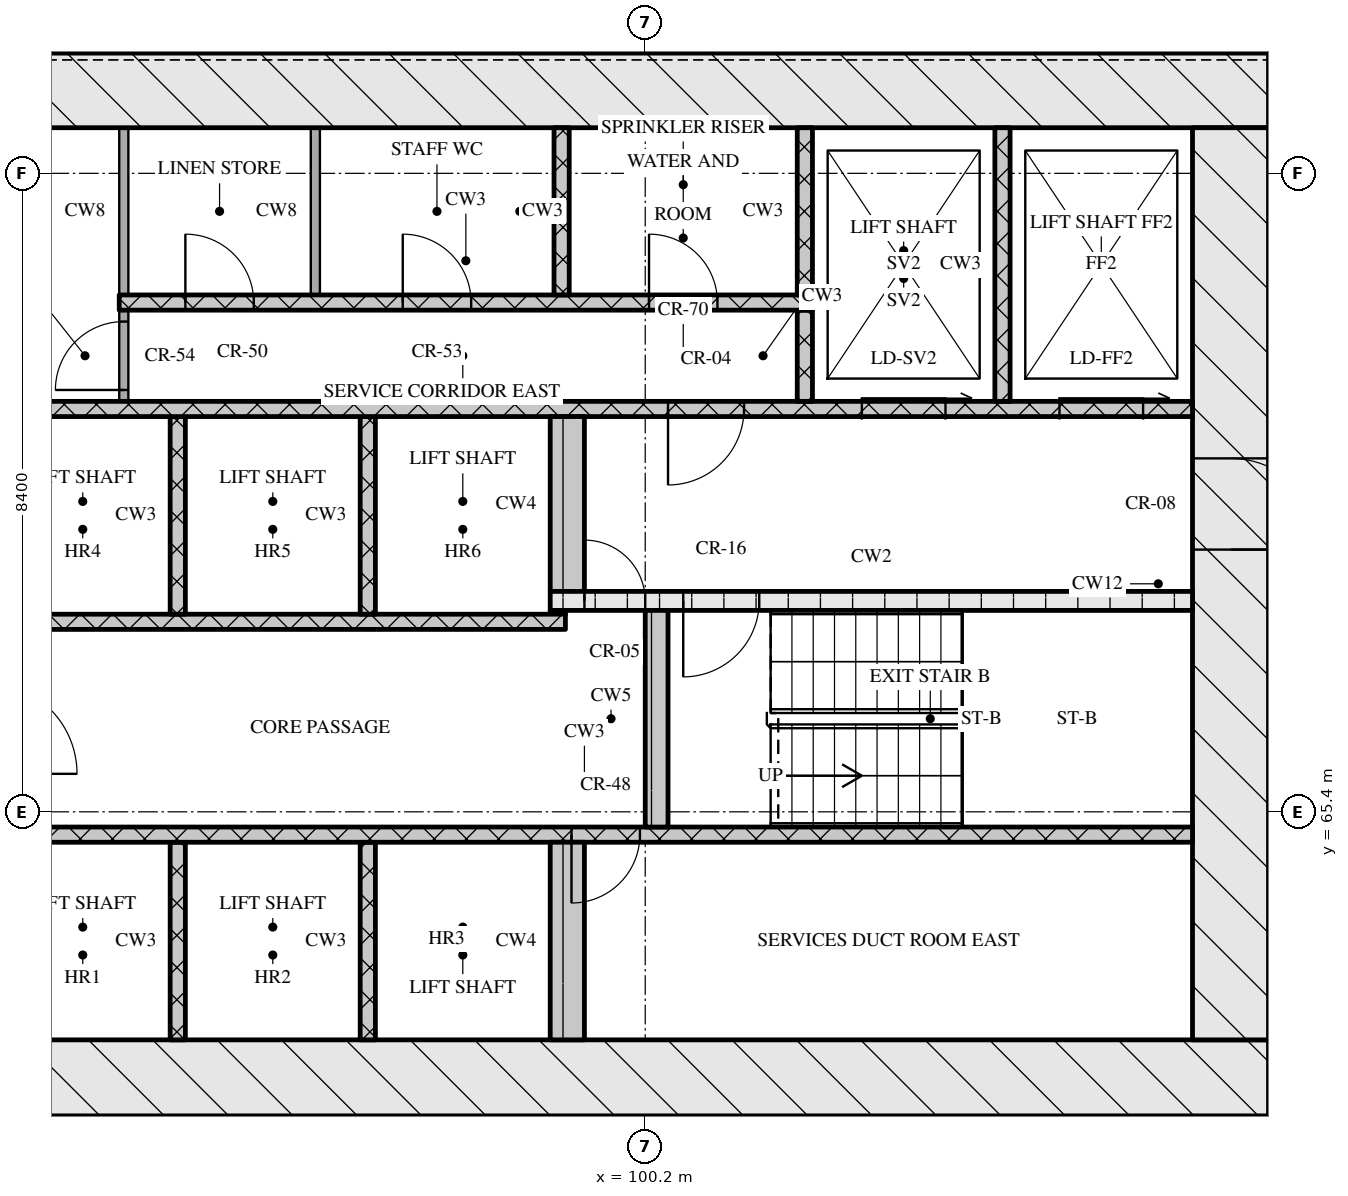
"""IFC4 building model, lengths in metres.
Left out: names, types, materials, properties, quantities, classifications, styles, units other than length and angle.
Written with IfcOpenShell. Run it as: python <this file> out.ifc"""

import sys

from ifc_helpers import new_model, si_unit, direction, frame, frame_2d, origin, place, context, subcontext, project, spatial, rectangle, extrude, element, fill, save


model = new_model("IFC4")
c1 = context("Model", 3, precision=1e-05, world=origin(), true_north=direction((0.0, 1.0)))
c2 = subcontext(c1, "Body", "Model", "MODEL_VIEW")
j1 = project(units=[si_unit("LENGTHUNIT", "METRE"), si_unit("PLANEANGLEUNIT", "RADIAN")], contexts=[c1])
p1 = place(None, origin())
s1 = spatial("IfcSite", under=j1, at=p1, CompositionType="ELEMENT")
p2 = place(p1, origin())
s2 = spatial("IfcBuilding", under=s1, at=p2, CompositionType="ELEMENT")
p3 = place(p2, frame((0.0, 0.0, 95.25)))
s3 = spatial("IfcBuildingStorey", under=s2, at=p3, CompositionType="ELEMENT", Elevation=95.25)
p4 = place(p3, frame((66.8, 61.9, 0.0), z_axis=(0.0, 0.0, 1.0), x_axis=(1.0, 0.0, 0.0)))
e1 = element("IfcWall", 1, at=p4, inside=s3, PredefinedType="SOLIDWALL", context=c2, shape_type="SweptSolid", body=[
    extrude(rectangle(XDim=41.6, YDim=1.0, at=frame_2d((20.8, 0.0))), origin(), (0.0, 0.0, 1.0), 3.32),
])
p5 = place(p4, frame((21.15, 0.0, 0.0)))
e2 = element("IfcOpeningElement", 2, at=p5, cuts=e1, PredefinedType="OPENING", context=c2, shape_type="SweptSolid", body=[
    extrude(rectangle(XDim=1.8, YDim=2.1, at=frame_2d((0.9, 1.05))), frame((0.0, 0.51, 0.0), z_axis=(0.0, -1.0, 0.0), x_axis=(1.0, 0.0, 0.0)), (0.0, 0.0, 1.0), 1.02),
])
p6 = place(p3, frame((66.8, 74.9, 0.0), z_axis=(0.0, 0.0, 1.0), x_axis=(1.0, 0.0, 0.0)))
e3 = element("IfcWall", 3, at=p6, inside=s3, PredefinedType="SOLIDWALL", context=c2, shape_type="SweptSolid", body=[
    extrude(rectangle(XDim=41.6, YDim=1.0, at=frame_2d((20.8, 0.0))), origin(), (0.0, 0.0, 1.0), 3.32),
])
p7 = place(p3, frame((107.9, 62.4, 0.0), z_axis=(0.0, 0.0, 1.0), x_axis=(0.0, 1.0, 0.0)))
e4 = element("IfcWall", 4, at=p7, inside=s3, PredefinedType="SOLIDWALL", context=c2, shape_type="SweptSolid", body=[
    extrude(rectangle(XDim=12.0, YDim=1.0, at=frame_2d((6.0, 0.0))), origin(), (0.0, 0.0, 1.0), 3.32),
])
p8 = place(p7, frame((6.45, 0.0, 0.0)))
e5 = element("IfcOpeningElement", 5, at=p8, cuts=e4, PredefinedType="OPENING", context=c2, shape_type="SweptSolid", body=[
    extrude(rectangle(XDim=1.2, YDim=2.1, at=frame_2d((0.6, 1.05))), frame((0.0, 0.51, 0.0), z_axis=(0.0, -1.0, 0.0), x_axis=(1.0, 0.0, 0.0)), (0.0, 0.0, 1.0), 1.02),
])
for number, where, z_axis, x_axis in (
    (6, (94.05, 62.4, 0.0), (0.0, 0.0, 1.0), (0.0, 1.0, 0.0)),
    (7, (96.55, 62.4, 0.0), (0.0, 0.0, 1.0), (0.0, 1.0, 0.0)),
):
    element("IfcWall", number, at=place(p3, frame(where, z_axis=z_axis, x_axis=x_axis)), inside=s3, PredefinedType="SOLIDWALL", context=c2, shape_type="SweptSolid", body=[
        extrude(rectangle(XDim=2.6, YDim=0.2, at=frame_2d((1.3, 0.0))), origin(), (0.0, 0.0, 1.0), 3.32),
    ])
p9 = place(p3, frame((99.175, 62.4, 0.0), z_axis=(0.0, 0.0, 1.0), x_axis=(0.0, 1.0, 0.0)))
e8 = element("IfcWall", 8, at=p9, inside=s3, PredefinedType="SOLIDWALL", context=c2, shape_type="SweptSolid", body=[
    extrude(rectangle(XDim=2.6, YDim=0.45, at=frame_2d((1.3, 0.0))), origin(), (0.0, 0.0, 1.0), 3.32),
])
p10 = place(p3, frame((91.4, 65.1, 0.0), z_axis=(0.0, 0.0, 1.0), x_axis=(1.0, 0.0, 0.0)))
e9 = element("IfcWall", 9, at=p10, inside=s3, PredefinedType="SOLIDWALL", context=c2, shape_type="SweptSolid", body=[
    extrude(rectangle(XDim=16.0, YDim=0.2, at=frame_2d((8.0, 0.0))), origin(), (0.0, 0.0, 1.0), 3.32),
])
p11 = place(p10, frame((7.83, 0.0, 0.0)))
e10 = element("IfcOpeningElement", 10, at=p11, cuts=e9, PredefinedType="OPENING", context=c2, shape_type="SweptSolid", body=[
    extrude(rectangle(XDim=0.9, YDim=2.1, at=frame_2d((0.45, 1.05))), frame((0.0, 0.11, 0.0), z_axis=(0.0, -1.0, 0.0), x_axis=(1.0, 0.0, 0.0)), (0.0, 0.0, 1.0), 0.22),
])
p12 = place(p3, frame((100.35, 65.2, 0.0), z_axis=(0.0, 0.0, 1.0), x_axis=(0.0, 1.0, 0.0)))
e11 = element("IfcWall", 11, at=p12, inside=s3, PredefinedType="SOLIDWALL", context=c2, shape_type="SweptSolid", body=[
    extrude(rectangle(XDim=2.85, YDim=0.3, at=frame_2d((1.425, 0.0))), origin(), (0.0, 0.0, 1.0), 3.32),
])
p13 = place(p3, frame((76.05, 67.9, 0.0), z_axis=(0.0, 0.0, 1.0), x_axis=(1.0, 0.0, 0.0)))
e12 = element("IfcWall", 12, at=p13, inside=s3, PredefinedType="SOLIDWALL", context=c2, shape_type="SweptSolid", body=[
    extrude(rectangle(XDim=23.1, YDim=0.2, at=frame_2d((11.55, 0.0))), origin(), (0.0, 0.0, 1.0), 3.32),
])
p14 = place(p13, frame((0.6, 0.0, 0.0)))
e13 = element("IfcOpeningElement", 13, at=p14, cuts=e12, PredefinedType="OPENING", context=c2, shape_type="SweptSolid", body=[
    extrude(rectangle(XDim=1.1, YDim=2.1, at=frame_2d((0.55, 1.05))), frame((0.0, 0.11, 0.0), z_axis=(0.0, -1.0, 0.0), x_axis=(1.0, 0.0, 0.0)), (0.0, 0.0, 1.0), 0.22),
])
p15 = place(p13, frame((3.1, 0.0, 0.0)))
e14 = element("IfcOpeningElement", 14, at=p15, cuts=e12, PredefinedType="OPENING", context=c2, shape_type="SweptSolid", body=[
    extrude(rectangle(XDim=1.1, YDim=2.1, at=frame_2d((0.55, 1.05))), frame((0.0, 0.11, 0.0), z_axis=(0.0, -1.0, 0.0), x_axis=(1.0, 0.0, 0.0)), (0.0, 0.0, 1.0), 0.22),
])
p16 = place(p13, frame((5.6, 0.0, 0.0)))
e15 = element("IfcOpeningElement", 15, at=p16, cuts=e12, PredefinedType="OPENING", context=c2, shape_type="SweptSolid", body=[
    extrude(rectangle(XDim=1.1, YDim=2.1, at=frame_2d((0.55, 1.05))), frame((0.0, 0.11, 0.0), z_axis=(0.0, -1.0, 0.0), x_axis=(1.0, 0.0, 0.0)), (0.0, 0.0, 1.0), 0.22),
])
p17 = place(p13, frame((8.45, 0.0, 0.0)))
e16 = element("IfcOpeningElement", 16, at=p17, cuts=e12, PredefinedType="OPENING", context=c2, shape_type="SweptSolid", body=[
    extrude(rectangle(XDim=0.9, YDim=2.1, at=frame_2d((0.45, 1.05))), frame((0.0, 0.11, 0.0), z_axis=(0.0, -1.0, 0.0), x_axis=(1.0, 0.0, 0.0)), (0.0, 0.0, 1.0), 0.22),
])
p18 = place(p13, frame((10.91, 0.0, 0.0)))
e17 = element("IfcOpeningElement", 17, at=p18, cuts=e12, PredefinedType="OPENING", context=c2, shape_type="SweptSolid", body=[
    extrude(rectangle(XDim=0.9, YDim=2.1, at=frame_2d((0.45, 1.05))), frame((0.0, 0.11, 0.0), z_axis=(0.0, -1.0, 0.0), x_axis=(1.0, 0.0, 0.0)), (0.0, 0.0, 1.0), 0.22),
])
p19 = place(p13, frame((13.55, 0.0, 0.0)))
e18 = element("IfcOpeningElement", 18, at=p19, cuts=e12, PredefinedType="OPENING", context=c2, shape_type="SweptSolid", body=[
    extrude(rectangle(XDim=1.0, YDim=2.1, at=frame_2d((0.5, 1.05))), frame((0.0, 0.11, 0.0), z_axis=(0.0, -1.0, 0.0), x_axis=(1.0, 0.0, 0.0)), (0.0, 0.0, 1.0), 0.22),
])
for number, where, z_axis, x_axis in (
    (19, (94.05, 68.0, 0.0), (0.0, 0.0, 1.0), (0.0, 1.0, 0.0)),
    (20, (96.55, 68.0, 0.0), (0.0, 0.0, 1.0), (0.0, 1.0, 0.0)),
):
    element("IfcWall", number, at=place(p3, frame(where, z_axis=z_axis, x_axis=x_axis)), inside=s3, PredefinedType="SOLIDWALL", context=c2, shape_type="SweptSolid", body=[
        extrude(rectangle(XDim=2.6, YDim=0.2, at=frame_2d((1.3, 0.0))), origin(), (0.0, 0.0, 1.0), 3.32),
    ])
p20 = place(p3, frame((98.95, 68.025, 0.0), z_axis=(0.0, 0.0, 1.0), x_axis=(1.0, 0.0, 0.0)))
e21 = element("IfcWall", 21, at=p20, inside=s3, PredefinedType="SOLIDWALL", context=c2, shape_type="SweptSolid", body=[
    extrude(rectangle(XDim=0.2, YDim=0.05, at=frame_2d((0.1, 0.0))), origin(), (0.0, 0.0, 1.0), 3.32),
])
p21 = place(p3, frame((98.95, 68.175, 0.0), z_axis=(0.0, 0.0, 1.0), x_axis=(1.0, 0.0, 0.0)))
e22 = element("IfcWall", 22, at=p21, inside=s3, PredefinedType="SOLIDWALL", context=c2, shape_type="SweptSolid", body=[
    extrude(rectangle(XDim=8.45, YDim=0.25, at=frame_2d((4.225, 0.0))), origin(), (0.0, 0.0, 1.0), 3.32),
])
p22 = place(p21, frame((0.45, 0.0, 0.0)))
e23 = element("IfcOpeningElement", 23, at=p22, cuts=e22, PredefinedType="OPENING", context=c2, shape_type="SweptSolid", body=[
    extrude(rectangle(XDim=0.8, YDim=2.1, at=frame_2d((0.4, 1.05))), frame((0.0, 0.135, 0.0), z_axis=(0.0, -1.0, 0.0), x_axis=(1.0, 0.0, 0.0)), (0.0, 0.0, 1.0), 0.27),
])
p23 = place(p21, frame((1.75, 0.0, 0.0)))
e24 = element("IfcOpeningElement", 24, at=p23, cuts=e22, PredefinedType="OPENING", context=c2, shape_type="SweptSolid", body=[
    extrude(rectangle(XDim=1.0, YDim=2.1, at=frame_2d((0.5, 1.05))), frame((0.0, 0.135, 0.0), z_axis=(0.0, -1.0, 0.0), x_axis=(1.0, 0.0, 0.0)), (0.0, 0.0, 1.0), 0.27),
])
p24 = place(p3, frame((99.175, 68.3, 0.0), z_axis=(0.0, 0.0, 1.0), x_axis=(0.0, 1.0, 0.0)))
e25 = element("IfcWall", 25, at=p24, inside=s3, PredefinedType="SOLIDWALL", context=c2, shape_type="SweptSolid", body=[
    extrude(rectangle(XDim=2.3, YDim=0.45, at=frame_2d((1.15, 0.0))), origin(), (0.0, 0.0, 1.0), 3.32),
])
p25 = place(p3, frame((67.8, 70.7, 0.0), z_axis=(0.0, 0.0, 1.0), x_axis=(1.0, 0.0, 0.0)))
e26 = element("IfcWall", 26, at=p25, inside=s3, PredefinedType="SOLIDWALL", context=c2, shape_type="SweptSolid", body=[
    extrude(rectangle(XDim=39.6, YDim=0.2, at=frame_2d((19.8, 0.0))), origin(), (0.0, 0.0, 1.0), 3.32),
])
p26 = place(p25, frame((0.65, 0.0, 0.0)))
e27 = element("IfcOpeningElement", 27, at=p26, cuts=e26, PredefinedType="OPENING", context=c2, shape_type="SweptSolid", body=[
    extrude(rectangle(XDim=1.1, YDim=2.1, at=frame_2d((0.55, 1.05))), frame((0.0, 0.11, 0.0), z_axis=(0.0, -1.0, 0.0), x_axis=(1.0, 0.0, 0.0)), (0.0, 0.0, 1.0), 0.22),
])
p27 = place(p25, frame((3.25, 0.0, 0.0)))
e28 = element("IfcOpeningElement", 28, at=p27, cuts=e26, PredefinedType="OPENING", context=c2, shape_type="SweptSolid", body=[
    extrude(rectangle(XDim=1.1, YDim=2.1, at=frame_2d((0.55, 1.05))), frame((0.0, 0.11, 0.0), z_axis=(0.0, -1.0, 0.0), x_axis=(1.0, 0.0, 0.0)), (0.0, 0.0, 1.0), 0.22),
])
p28 = place(p25, frame((5.9, 0.0, 0.0)))
e29 = element("IfcOpeningElement", 29, at=p28, cuts=e26, PredefinedType="OPENING", context=c2, shape_type="SweptSolid", body=[
    extrude(rectangle(XDim=1.0, YDim=2.1, at=frame_2d((0.5, 1.05))), frame((0.0, 0.11, 0.0), z_axis=(0.0, -1.0, 0.0), x_axis=(1.0, 0.0, 0.0)), (0.0, 0.0, 1.0), 0.22),
])
p29 = place(p25, frame((21.7, 0.0, 0.0)))
e30 = element("IfcOpeningElement", 30, at=p29, cuts=e26, PredefinedType="OPENING", context=c2, shape_type="SweptSolid", body=[
    extrude(rectangle(XDim=1.0, YDim=2.1, at=frame_2d((0.5, 1.05))), frame((0.0, 0.11, 0.0), z_axis=(0.0, -1.0, 0.0), x_axis=(1.0, 0.0, 0.0)), (0.0, 0.0, 1.0), 0.22),
])
p30 = place(p25, frame((32.7, 0.0, 0.0)))
e31 = element("IfcOpeningElement", 31, at=p30, cuts=e26, PredefinedType="OPENING", context=c2, shape_type="SweptSolid", body=[
    extrude(rectangle(XDim=1.0, YDim=2.1, at=frame_2d((0.5, 1.05))), frame((0.0, 0.11, 0.0), z_axis=(0.0, -1.0, 0.0), x_axis=(1.0, 0.0, 0.0)), (0.0, 0.0, 1.0), 0.22),
])
p31 = place(p25, frame((35.25, 0.0, 0.0)))
e32 = element("IfcOpeningElement", 32, at=p31, cuts=e26, PredefinedType="OPENING", context=c2, shape_type="SweptSolid", body=[
    extrude(rectangle(XDim=1.1, YDim=2.1, at=frame_2d((0.55, 1.05))), frame((0.0, 0.11, 0.0), z_axis=(0.0, -1.0, 0.0), x_axis=(1.0, 0.0, 0.0)), (0.0, 0.0, 1.0), 0.22),
])
p32 = place(p25, frame((37.85, 0.0, 0.0)))
e33 = element("IfcOpeningElement", 33, at=p32, cuts=e26, PredefinedType="OPENING", context=c2, shape_type="SweptSolid", body=[
    extrude(rectangle(XDim=1.1, YDim=2.1, at=frame_2d((0.55, 1.05))), frame((0.0, 0.11, 0.0), z_axis=(0.0, -1.0, 0.0), x_axis=(1.0, 0.0, 0.0)), (0.0, 0.0, 1.0), 0.22),
])
p33 = place(p3, frame((93.34, 70.8, 0.0), z_axis=(0.0, 0.0, 1.0), x_axis=(0.0, 1.0, 0.0)))
e34 = element("IfcWall", 34, at=p33, inside=s3, PredefinedType="PARTITIONING", context=c2, shape_type="SweptSolid", body=[
    extrude(rectangle(XDim=1.2, YDim=0.12, at=frame_2d((0.6, 0.0))), origin(), (0.0, 0.0, 1.0), 3.32),
])
p34 = place(p33, frame((0.15, 0.0, 0.0)))
e35 = element("IfcOpeningElement", 35, at=p34, cuts=e34, PredefinedType="OPENING", context=c2, shape_type="SweptSolid", body=[
    extrude(rectangle(XDim=0.9, YDim=2.1, at=frame_2d((0.45, 1.05))), frame((0.0, 0.07, 0.0), z_axis=(0.0, -1.0, 0.0), x_axis=(1.0, 0.0, 0.0)), (0.0, 0.0, 1.0), 0.14),
])
p35 = place(p3, frame((102.3, 70.8, 0.0), z_axis=(0.0, 0.0, 1.0), x_axis=(0.0, 1.0, 0.0)))
e36 = element("IfcWall", 36, at=p35, inside=s3, PredefinedType="SOLIDWALL", context=c2, shape_type="SweptSolid", body=[
    extrude(rectangle(XDim=1.2, YDim=0.2, at=frame_2d((0.6, 0.0))), origin(), (0.0, 0.0, 1.0), 3.32),
])
p36 = place(p3, frame((104.9, 70.8, 0.0), z_axis=(0.0, 0.0, 1.0), x_axis=(0.0, 1.0, 0.0)))
e37 = element("IfcWall", 37, at=p36, inside=s3, PredefinedType="SOLIDWALL", context=c2, shape_type="SweptSolid", body=[
    extrude(rectangle(XDim=3.6, YDim=0.2, at=frame_2d((1.8, 0.0))), origin(), (0.0, 0.0, 1.0), 3.32),
])
p37 = place(p3, frame((93.28, 72.1, 0.0), z_axis=(0.0, 0.0, 1.0), x_axis=(1.0, 0.0, 0.0)))
e38 = element("IfcWall", 38, at=p37, inside=s3, PredefinedType="SOLIDWALL", context=c2, shape_type="SweptSolid", body=[
    extrude(rectangle(XDim=9.12, YDim=0.2, at=frame_2d((4.56, 0.0))), origin(), (0.0, 0.0, 1.0), 3.32),
])
p38 = place(p37, frame((0.87, 0.0, 0.0)))
e39 = element("IfcOpeningElement", 39, at=p38, cuts=e38, PredefinedType="OPENING", context=c2, shape_type="SweptSolid", body=[
    extrude(rectangle(XDim=0.9, YDim=2.1, at=frame_2d((0.45, 1.05))), frame((0.0, 0.11, 0.0), z_axis=(0.0, -1.0, 0.0), x_axis=(1.0, 0.0, 0.0)), (0.0, 0.0, 1.0), 0.22),
])
p39 = place(p37, frame((3.73, 0.0, 0.0)))
e40 = element("IfcOpeningElement", 40, at=p39, cuts=e38, PredefinedType="OPENING", context=c2, shape_type="SweptSolid", body=[
    extrude(rectangle(XDim=0.9, YDim=2.1, at=frame_2d((0.45, 1.05))), frame((0.0, 0.11, 0.0), z_axis=(0.0, -1.0, 0.0), x_axis=(1.0, 0.0, 0.0)), (0.0, 0.0, 1.0), 0.22),
])
p40 = place(p37, frame((6.97, 0.0, 0.0)))
e41 = element("IfcOpeningElement", 41, at=p40, cuts=e38, PredefinedType="OPENING", context=c2, shape_type="SweptSolid", body=[
    extrude(rectangle(XDim=0.9, YDim=2.1, at=frame_2d((0.45, 1.05))), frame((0.0, 0.11, 0.0), z_axis=(0.0, -1.0, 0.0), x_axis=(1.0, 0.0, 0.0)), (0.0, 0.0, 1.0), 0.22),
])
for number, where, z_axis, x_axis in (
    (42, (93.34, 72.2, 0.0), (0.0, 0.0, 1.0), (0.0, 1.0, 0.0)),
    (43, (95.86, 72.2, 0.0), (0.0, 0.0, 1.0), (0.0, 1.0, 0.0)),
):
    element("IfcWall", number, at=place(p3, frame(where, z_axis=z_axis, x_axis=x_axis)), inside=s3, PredefinedType="PARTITIONING", context=c2, shape_type="SweptSolid", body=[
        extrude(rectangle(XDim=2.2, YDim=0.12, at=frame_2d((1.1, 0.0))), origin(), (0.0, 0.0, 1.0), 3.32),
    ])
for number, where, z_axis, x_axis in (
    (44, (99.1, 72.2, 0.0), (0.0, 0.0, 1.0), (0.0, 1.0, 0.0)),
    (45, (102.3, 72.2, 0.0), (0.0, 0.0, 1.0), (0.0, 1.0, 0.0)),
):
    element("IfcWall", number, at=place(p3, frame(where, z_axis=z_axis, x_axis=x_axis)), inside=s3, PredefinedType="SOLIDWALL", context=c2, shape_type="SweptSolid", body=[
        extrude(rectangle(XDim=2.2, YDim=0.2, at=frame_2d((1.1, 0.0))), origin(), (0.0, 0.0, 1.0), 3.32),
    ])
p41 = place(p11, origin())
e46 = element("IfcDoor", 46, at=p41, inside=s3, OperationType="SINGLE_SWING_RIGHT", PredefinedType="DOOR", context=c2, shape_type="SweptSolid", body=[
    extrude(rectangle(XDim=0.9, YDim=2.1, at=frame_2d((0.45, 1.05))), frame((0.0, 0.025, 0.0), z_axis=(0.0, -1.0, 0.0), x_axis=(1.0, 0.0, 0.0)), (0.0, 0.0, 1.0), 0.05),
])
fill(e10, e46)
p42 = place(p22, origin())
e47 = element("IfcDoor", 47, at=p42, inside=s3, OperationType="SINGLE_SWING_LEFT", PredefinedType="DOOR", context=c2, shape_type="SweptSolid", body=[
    extrude(rectangle(XDim=0.8, YDim=2.1, at=frame_2d((0.4, 1.05))), frame((0.0, 0.025, 0.0), z_axis=(0.0, -1.0, 0.0), x_axis=(1.0, 0.0, 0.0)), (0.0, 0.0, 1.0), 0.05),
])
fill(e23, e47)
p43 = place(p23, origin())
e48 = element("IfcDoor", 48, at=p43, inside=s3, OperationType="SINGLE_SWING_RIGHT", PredefinedType="DOOR", context=c2, shape_type="SweptSolid", body=[
    extrude(rectangle(XDim=1.0, YDim=2.1, at=frame_2d((0.5, 1.05))), frame((0.0, 0.025, 0.0), z_axis=(0.0, -1.0, 0.0), x_axis=(1.0, 0.0, 0.0)), (0.0, 0.0, 1.0), 0.05),
])
fill(e24, e48)
p44 = place(p8, origin())
e49 = element("IfcDoor", 49, at=p44, inside=s3, OperationType="SINGLE_SWING_RIGHT", PredefinedType="DOOR", context=c2, shape_type="SweptSolid", body=[
    extrude(rectangle(XDim=1.2, YDim=2.1, at=frame_2d((0.6, 1.05))), frame((0.0, 0.025, 0.0), z_axis=(0.0, -1.0, 0.0), x_axis=(1.0, 0.0, 0.0)), (0.0, 0.0, 1.0), 0.05),
])
fill(e5, e49)
p45 = place(p30, origin())
e50 = element("IfcDoor", 50, at=p45, inside=s3, OperationType="SINGLE_SWING_RIGHT", PredefinedType="DOOR", context=c2, shape_type="SweptSolid", body=[
    extrude(rectangle(XDim=1.0, YDim=2.1, at=frame_2d((0.5, 1.05))), frame((0.0, 0.025, 0.0), z_axis=(0.0, -1.0, 0.0), x_axis=(1.0, 0.0, 0.0)), (0.0, 0.0, 1.0), 0.05),
])
fill(e31, e50)
p46 = place(p31, origin())
e51 = element("IfcDoor", 51, at=p46, inside=s3, OperationType="SLIDING_TO_RIGHT", PredefinedType="DOOR", context=c2, shape_type="SweptSolid", body=[
    extrude(rectangle(XDim=1.1, YDim=2.1, at=frame_2d((0.55, 1.05))), frame((0.0, 0.025, 0.0), z_axis=(0.0, -1.0, 0.0), x_axis=(1.0, 0.0, 0.0)), (0.0, 0.0, 1.0), 0.05),
])
fill(e32, e51)
p47 = place(p32, origin())
e52 = element("IfcDoor", 52, at=p47, inside=s3, OperationType="SLIDING_TO_RIGHT", PredefinedType="DOOR", context=c2, shape_type="SweptSolid", body=[
    extrude(rectangle(XDim=1.1, YDim=2.1, at=frame_2d((0.55, 1.05))), frame((0.0, 0.025, 0.0), z_axis=(0.0, -1.0, 0.0), x_axis=(1.0, 0.0, 0.0)), (0.0, 0.0, 1.0), 0.05),
])
fill(e33, e52)
p48 = place(p34, origin())
e53 = element("IfcDoor", 53, at=p48, inside=s3, OperationType="SINGLE_SWING_LEFT", PredefinedType="DOOR", context=c2, shape_type="SweptSolid", body=[
    extrude(rectangle(XDim=0.9, YDim=2.1, at=frame_2d((0.45, 1.05))), frame((0.0, 0.025, 0.0), z_axis=(0.0, -1.0, 0.0), x_axis=(1.0, 0.0, 0.0)), (0.0, 0.0, 1.0), 0.05),
])
fill(e35, e53)
p49 = place(p38, origin())
e54 = element("IfcDoor", 54, at=p49, inside=s3, OperationType="SINGLE_SWING_LEFT", PredefinedType="DOOR", context=c2, shape_type="SweptSolid", body=[
    extrude(rectangle(XDim=0.9, YDim=2.1, at=frame_2d((0.45, 1.05))), frame((0.0, 0.025, 0.0), z_axis=(0.0, -1.0, 0.0), x_axis=(1.0, 0.0, 0.0)), (0.0, 0.0, 1.0), 0.05),
])
fill(e39, e54)
p50 = place(p39, origin())
e55 = element("IfcDoor", 55, at=p50, inside=s3, OperationType="SINGLE_SWING_LEFT", PredefinedType="DOOR", context=c2, shape_type="SweptSolid", body=[
    extrude(rectangle(XDim=0.9, YDim=2.1, at=frame_2d((0.45, 1.05))), frame((0.0, 0.025, 0.0), z_axis=(0.0, -1.0, 0.0), x_axis=(1.0, 0.0, 0.0)), (0.0, 0.0, 1.0), 0.05),
])
fill(e40, e55)
p51 = place(p40, origin())
e56 = element("IfcDoor", 56, at=p51, inside=s3, OperationType="SINGLE_SWING_LEFT", PredefinedType="DOOR", context=c2, shape_type="SweptSolid", body=[
    extrude(rectangle(XDim=0.9, YDim=2.1, at=frame_2d((0.45, 1.05))), frame((0.0, 0.025, 0.0), z_axis=(0.0, -1.0, 0.0), x_axis=(1.0, 0.0, 0.0)), (0.0, 0.0, 1.0), 0.05),
])
fill(e41, e56)
save(model, sys.argv[1])
